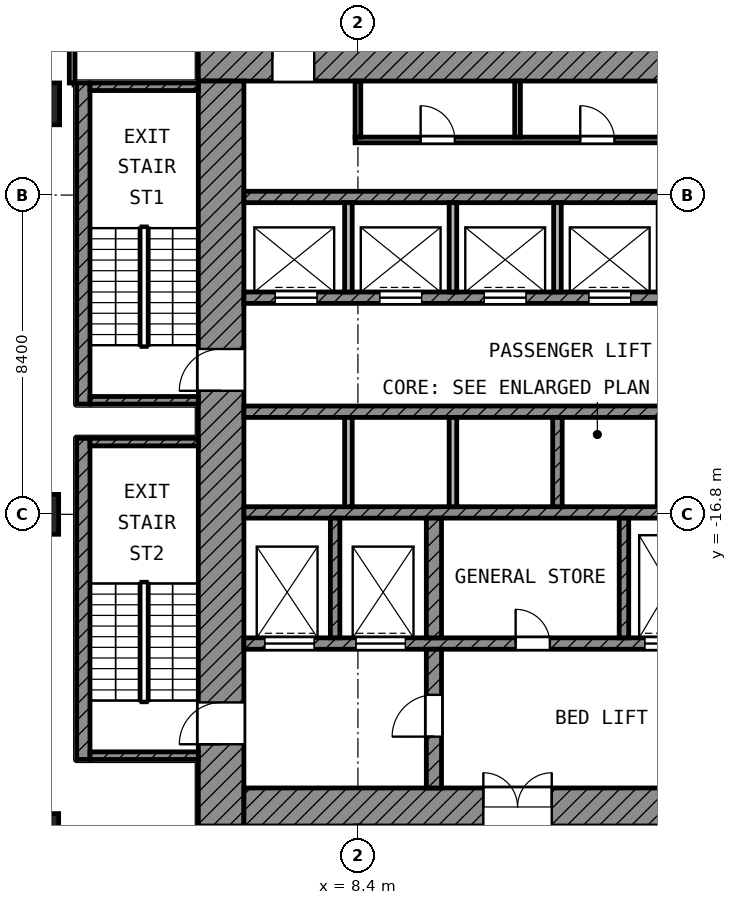
"""IFC4 building model, lengths in metres.
Left out: names, types, materials, properties, quantities, classifications, styles, units other than length and angle.
Written with IfcOpenShell. Run it as: python <this file> out.ifc"""

import sys

from ifc_helpers import new_model, si_unit, direction, frame, frame_2d, origin, origin_2d, place, context, subcontext, project, spatial, rectangle, extrude, element, fill, save


model = new_model("IFC4")
c1 = context("Model", 3, precision=1e-05, world=origin(), true_north=direction((0.0, 1.0)))
c2 = subcontext(c1, "Body", "Model", "MODEL_VIEW")
j1 = project(units=[si_unit("LENGTHUNIT", "METRE"), si_unit("PLANEANGLEUNIT", "RADIAN")], contexts=[c1])
p1 = place(None, origin())
s1 = spatial("IfcSite", under=j1, at=p1, CompositionType="ELEMENT")
p2 = place(p1, origin())
s2 = spatial("IfcBuilding", under=s1, at=p2, CompositionType="ELEMENT")
p3 = place(p2, frame((0.0, 0.0, 124.0)))
s3 = spatial("IfcBuildingStorey", under=s2, at=p3, CompositionType="ELEMENT", Elevation=124.0)
p4 = place(p3, frame((0.0, -6.0, 0.0), z_axis=(0.0, 0.0, 1.0), x_axis=(1.0, 0.0, 0.0)))
e1 = element("IfcColumn", 1, at=p4, inside=s3, PredefinedType="COLUMN", context=c2, shape_type="SweptSolid", body=[
    extrude(rectangle(XDim=1.1, YDim=1.1, at=origin_2d()), origin(), (0.0, 0.0, 1.0), 4.2),
])
for number, where, z_axis, x_axis in (
    (2, (0.0, -16.8, 0.0), (0.0, 0.0, 1.0), (1.0, 0.0, 0.0)),
    (3, (0.0, -25.2, 0.0), (0.0, 0.0, 1.0), (1.0, 0.0, 0.0)),
):
    element("IfcColumn", number, at=place(p3, frame(where, z_axis=z_axis, x_axis=x_axis)), inside=s3, PredefinedType="COLUMN", context=c2, shape_type="SweptSolid", body=[
        extrude(rectangle(XDim=1.05, YDim=1.05, at=origin_2d()), origin(), (0.0, 0.0, 1.0), 4.2),
    ])
p5 = place(p3, frame((4.2, -4.8, 0.0), z_axis=(0.0, 0.0, 1.0), x_axis=(1.0, 0.0, 0.0)))
e4 = element("IfcWall", 4, at=p5, inside=s3, PredefinedType="SHEAR", context=c2, shape_type="SweptSolid", body=[
    extrude(rectangle(XDim=20.8, YDim=1.2, at=frame_2d((10.4, 0.0))), origin(), (0.0, 0.0, 1.0), 3.6),
])
p6 = place(p5, frame((1.95, 0.0, 0.0)))
e5 = element("IfcOpeningElement", 5, at=p6, cuts=e4, PredefinedType="OPENING", context=c2, shape_type="SweptSolid", body=[
    extrude(rectangle(XDim=1.1, YDim=2.1, at=frame_2d((0.55, 1.05))), frame((0.0, 0.61, 0.0), z_axis=(0.0, -1.0, 0.0), x_axis=(1.0, 0.0, 0.0)), (0.0, 0.0, 1.0), 1.22),
])
p7 = place(p5, frame((17.95, 0.0, 0.0)))
e6 = element("IfcOpeningElement", 6, at=p7, cuts=e4, PredefinedType="OPENING", context=c2, shape_type="SweptSolid", body=[
    extrude(rectangle(XDim=1.1, YDim=2.1, at=frame_2d((0.55, 1.05))), frame((0.0, 0.61, 0.0), z_axis=(0.0, -1.0, 0.0), x_axis=(1.0, 0.0, 0.0)), (0.0, 0.0, 1.0), 1.22),
])
p8 = place(p3, frame((4.8, -25.0, 0.0), z_axis=(0.0, 0.0, 1.0), x_axis=(0.0, 1.0, 0.0)))
e7 = element("IfcWall", 7, at=p8, inside=s3, PredefinedType="SHEAR", context=c2, shape_type="SweptSolid", body=[
    extrude(rectangle(XDim=19.6, YDim=1.2, at=frame_2d((9.8, 0.0))), origin(), (0.0, 0.0, 1.0), 3.6),
])
p9 = place(p8, frame((11.45, 0.0, 0.0)))
e8 = element("IfcOpeningElement", 8, at=p9, cuts=e7, PredefinedType="OPENING", context=c2, shape_type="SweptSolid", body=[
    extrude(rectangle(XDim=1.1, YDim=2.1, at=frame_2d((0.55, 1.05))), frame((0.0, 0.61, 0.0), z_axis=(0.0, -1.0, 0.0), x_axis=(1.0, 0.0, 0.0)), (0.0, 0.0, 1.0), 1.22),
])
p10 = place(p8, frame((2.15, 0.0, 0.0)))
e9 = element("IfcOpeningElement", 9, at=p10, cuts=e7, PredefinedType="OPENING", context=c2, shape_type="SweptSolid", body=[
    extrude(rectangle(XDim=1.1, YDim=2.1, at=frame_2d((0.55, 1.05))), frame((0.0, 0.61, 0.0), z_axis=(0.0, -1.0, 0.0), x_axis=(1.0, 0.0, 0.0)), (0.0, 0.0, 1.0), 1.22),
])
p11 = place(p3, frame((5.4, -24.5, 0.0), z_axis=(0.0, 0.0, 1.0), x_axis=(1.0, 0.0, 0.0)))
e10 = element("IfcWall", 10, at=p11, inside=s3, PredefinedType="SHEAR", context=c2, shape_type="SweptSolid", body=[
    extrude(rectangle(XDim=18.6, YDim=1.0, at=frame_2d((9.3, 0.0))), origin(), (0.0, 0.0, 1.0), 3.6),
])
p12 = place(p11, frame((6.3, 0.0, 0.0)))
e11 = element("IfcOpeningElement", 11, at=p12, cuts=e10, PredefinedType="OPENING", context=c2, shape_type="SweptSolid", body=[
    extrude(rectangle(XDim=1.8, YDim=2.1, at=frame_2d((0.9, 1.05))), frame((0.0, 0.51, 0.0), z_axis=(0.0, -1.0, 0.0), x_axis=(1.0, 0.0, 0.0)), (0.0, 0.0, 1.0), 1.02),
])
p13 = place(p3, frame((5.4, -8.45, 0.0), z_axis=(0.0, 0.0, 1.0), x_axis=(1.0, 0.0, 0.0)))
e12 = element("IfcWall", 12, at=p13, inside=s3, PredefinedType="SHEAR", context=c2, shape_type="SweptSolid", body=[
    extrude(rectangle(XDim=16.65, YDim=0.3, at=frame_2d((8.325, 0.0))), origin(), (0.0, 0.0, 1.0), 3.6),
])
p14 = place(p3, frame((5.4, -11.1, 0.0), z_axis=(0.0, 0.0, 1.0), x_axis=(1.0, 0.0, 0.0)))
e13 = element("IfcWall", 13, at=p14, inside=s3, PredefinedType="SHEAR", context=c2, shape_type="SweptSolid", body=[
    extrude(rectangle(XDim=16.65, YDim=0.3, at=frame_2d((8.325, 0.0))), origin(), (0.0, 0.0, 1.0), 3.6),
])
p15 = place(p14, frame((0.825, 0.0, 0.0)))
e14 = element("IfcOpeningElement", 14, at=p15, cuts=e13, PredefinedType="OPENING", context=c2, shape_type="SweptSolid", body=[
    extrude(rectangle(XDim=1.1, YDim=2.1, at=frame_2d((0.55, 1.05))), frame((0.0, 0.16, 0.0), z_axis=(0.0, -1.0, 0.0), x_axis=(1.0, 0.0, 0.0)), (0.0, 0.0, 1.0), 0.32),
])
p16 = place(p14, frame((3.575, 0.0, 0.0)))
e15 = element("IfcOpeningElement", 15, at=p16, cuts=e13, PredefinedType="OPENING", context=c2, shape_type="SweptSolid", body=[
    extrude(rectangle(XDim=1.1, YDim=2.1, at=frame_2d((0.55, 1.05))), frame((0.0, 0.16, 0.0), z_axis=(0.0, -1.0, 0.0), x_axis=(1.0, 0.0, 0.0)), (0.0, 0.0, 1.0), 0.32),
])
p17 = place(p14, frame((6.325, 0.0, 0.0)))
e16 = element("IfcOpeningElement", 16, at=p17, cuts=e13, PredefinedType="OPENING", context=c2, shape_type="SweptSolid", body=[
    extrude(rectangle(XDim=1.1, YDim=2.1, at=frame_2d((0.55, 1.05))), frame((0.0, 0.16, 0.0), z_axis=(0.0, -1.0, 0.0), x_axis=(1.0, 0.0, 0.0)), (0.0, 0.0, 1.0), 0.32),
])
p18 = place(p14, frame((9.075, 0.0, 0.0)))
e17 = element("IfcOpeningElement", 17, at=p18, cuts=e13, PredefinedType="OPENING", context=c2, shape_type="SweptSolid", body=[
    extrude(rectangle(XDim=1.1, YDim=2.1, at=frame_2d((0.55, 1.05))), frame((0.0, 0.16, 0.0), z_axis=(0.0, -1.0, 0.0), x_axis=(1.0, 0.0, 0.0)), (0.0, 0.0, 1.0), 0.32),
])
for number, where, z_axis, x_axis in (
    (18, (5.4, -14.1, 0.0), (0.0, 0.0, 1.0), (1.0, 0.0, 0.0)),
    (19, (5.4, -16.75, 0.0), (0.0, 0.0, 1.0), (1.0, 0.0, 0.0)),
):
    element("IfcWall", number, at=place(p3, frame(where, z_axis=z_axis, x_axis=x_axis)), inside=s3, PredefinedType="SHEAR", context=c2, shape_type="SweptSolid", body=[
        extrude(rectangle(XDim=16.65, YDim=0.3, at=frame_2d((8.325, 0.0))), origin(), (0.0, 0.0, 1.0), 3.6),
    ])
p19 = place(p3, frame((5.4, -20.2, 0.0), z_axis=(0.0, 0.0, 1.0), x_axis=(1.0, 0.0, 0.0)))
e20 = element("IfcWall", 20, at=p19, inside=s3, PredefinedType="SHEAR", context=c2, shape_type="SweptSolid", body=[
    extrude(rectangle(XDim=14.65, YDim=0.3, at=frame_2d((7.325, 0.0))), origin(), (0.0, 0.0, 1.0), 3.6),
])
p20 = place(p19, frame((10.55, 0.0, 0.0)))
e21 = element("IfcOpeningElement", 21, at=p20, cuts=e20, PredefinedType="OPENING", context=c2, shape_type="SweptSolid", body=[
    extrude(rectangle(XDim=1.3, YDim=2.1, at=frame_2d((0.65, 1.05))), frame((0.0, 0.16, 0.0), z_axis=(0.0, -1.0, 0.0), x_axis=(1.0, 0.0, 0.0)), (0.0, 0.0, 1.0), 0.32),
])
p21 = place(p19, frame((12.95, 0.0, 0.0)))
e22 = element("IfcOpeningElement", 22, at=p21, cuts=e20, PredefinedType="OPENING", context=c2, shape_type="SweptSolid", body=[
    extrude(rectangle(XDim=1.3, YDim=2.1, at=frame_2d((0.65, 1.05))), frame((0.0, 0.16, 0.0), z_axis=(0.0, -1.0, 0.0), x_axis=(1.0, 0.0, 0.0)), (0.0, 0.0, 1.0), 0.32),
])
p22 = place(p19, frame((0.55, 0.0, 0.0)))
e23 = element("IfcOpeningElement", 23, at=p22, cuts=e20, PredefinedType="OPENING", context=c2, shape_type="SweptSolid", body=[
    extrude(rectangle(XDim=1.3, YDim=2.1, at=frame_2d((0.65, 1.05))), frame((0.0, 0.16, 0.0), z_axis=(0.0, -1.0, 0.0), x_axis=(1.0, 0.0, 0.0)), (0.0, 0.0, 1.0), 0.32),
])
p23 = place(p19, frame((2.95, 0.0, 0.0)))
e24 = element("IfcOpeningElement", 24, at=p23, cuts=e20, PredefinedType="OPENING", context=c2, shape_type="SweptSolid", body=[
    extrude(rectangle(XDim=1.3, YDim=2.1, at=frame_2d((0.65, 1.05))), frame((0.0, 0.16, 0.0), z_axis=(0.0, -1.0, 0.0), x_axis=(1.0, 0.0, 0.0)), (0.0, 0.0, 1.0), 0.32),
])
p24 = place(p19, frame((7.15, 0.0, 0.0)))
e25 = element("IfcOpeningElement", 25, at=p24, cuts=e20, PredefinedType="OPENING", context=c2, shape_type="SweptSolid", body=[
    extrude(rectangle(XDim=0.9, YDim=2.1, at=frame_2d((0.45, 1.05))), frame((0.0, 0.16, 0.0), z_axis=(0.0, -1.0, 0.0), x_axis=(1.0, 0.0, 0.0)), (0.0, 0.0, 1.0), 0.32),
])
p25 = place(p3, frame((10.4, -24.0, 0.0), z_axis=(0.0, 0.0, 1.0), x_axis=(0.0, 1.0, 0.0)))
e26 = element("IfcWall", 26, at=p25, inside=s3, PredefinedType="SHEAR", context=c2, shape_type="SweptSolid", body=[
    extrude(rectangle(XDim=3.65, YDim=0.4, at=frame_2d((1.825, 0.0))), origin(), (0.0, 0.0, 1.0), 3.6),
])
p26 = place(p25, frame((1.35, 0.0, 0.0)))
e27 = element("IfcOpeningElement", 27, at=p26, cuts=e26, PredefinedType="OPENING", context=c2, shape_type="SweptSolid", body=[
    extrude(rectangle(XDim=1.1, YDim=2.1, at=frame_2d((0.55, 1.05))), frame((0.0, 0.21, 0.0), z_axis=(0.0, -1.0, 0.0), x_axis=(1.0, 0.0, 0.0)), (0.0, 0.0, 1.0), 0.42),
])
p27 = place(p3, frame((10.4, -20.05, 0.0), z_axis=(0.0, 0.0, 1.0), x_axis=(0.0, 1.0, 0.0)))
e28 = element("IfcWall", 28, at=p27, inside=s3, PredefinedType="SHEAR", context=c2, shape_type="SweptSolid", body=[
    extrude(rectangle(XDim=3.15, YDim=0.4, at=frame_2d((1.575, 0.0))), origin(), (0.0, 0.0, 1.0), 3.6),
])
for number, where, z_axis, x_axis in (
    (29, (7.8, -20.05, 0.0), (0.0, 0.0, 1.0), (0.0, 1.0, 0.0)),
    (30, (15.4, -20.05, 0.0), (0.0, 0.0, 1.0), (0.0, 1.0, 0.0)),
):
    element("IfcWall", number, at=place(p3, frame(where, z_axis=z_axis, x_axis=x_axis)), inside=s3, PredefinedType="SHEAR", context=c2, shape_type="SweptSolid", body=[
        extrude(rectangle(XDim=3.15, YDim=0.25, at=frame_2d((1.575, 0.0))), origin(), (0.0, 0.0, 1.0), 3.6),
    ])
for number, where, z_axis, x_axis in (
    (31, (8.15, -10.95, 0.0), (0.0, 0.0, 1.0), (0.0, 1.0, 0.0)),
    (32, (10.9, -10.95, 0.0), (0.0, 0.0, 1.0), (0.0, 1.0, 0.0)),
    (33, (13.65, -10.95, 0.0), (0.0, 0.0, 1.0), (0.0, 1.0, 0.0)),
):
    element("IfcWall", number, at=place(p3, frame(where, z_axis=z_axis, x_axis=x_axis)), inside=s3, PredefinedType="PARTITIONING", context=c2, shape_type="SweptSolid", body=[
        extrude(rectangle(XDim=2.35, YDim=0.2, at=frame_2d((1.175, 0.0))), origin(), (0.0, 0.0, 1.0), 3.6),
    ])
for number, where, z_axis, x_axis in (
    (34, (8.15, -16.6, 0.0), (0.0, 0.0, 1.0), (0.0, 1.0, 0.0)),
    (35, (10.9, -16.6, 0.0), (0.0, 0.0, 1.0), (0.0, 1.0, 0.0)),
):
    element("IfcWall", number, at=place(p3, frame(where, z_axis=z_axis, x_axis=x_axis)), inside=s3, PredefinedType="PARTITIONING", context=c2, shape_type="SweptSolid", body=[
        extrude(rectangle(XDim=2.35, YDim=0.2, at=frame_2d((1.175, 0.0))), origin(), (0.0, 0.0, 1.0), 3.6),
    ])
p28 = place(p3, frame((13.65, -16.6, 0.0), z_axis=(0.0, 0.0, 1.0), x_axis=(0.0, 1.0, 0.0)))
e36 = element("IfcWall", 36, at=p28, inside=s3, PredefinedType="SHEAR", context=c2, shape_type="SweptSolid", body=[
    extrude(rectangle(XDim=2.35, YDim=0.25, at=frame_2d((1.175, 0.0))), origin(), (0.0, 0.0, 1.0), 3.6),
])
p29 = place(p3, frame((8.325, -6.95, 0.0), z_axis=(0.0, 0.0, 1.0), x_axis=(1.0, 0.0, 0.0)))
e37 = element("IfcWall", 37, at=p29, inside=s3, PredefinedType="PARTITIONING", context=c2, shape_type="SweptSolid", body=[
    extrude(rectangle(XDim=12.75, YDim=0.15, at=frame_2d((6.375, 0.0))), origin(), (0.0, 0.0, 1.0), 3.6),
])
p30 = place(p29, frame((1.725, 0.0, 0.0)))
e38 = element("IfcOpeningElement", 38, at=p30, cuts=e37, PredefinedType="OPENING", context=c2, shape_type="SweptSolid", body=[
    extrude(rectangle(XDim=0.9, YDim=2.1, at=frame_2d((0.45, 1.05))), frame((0.0, 0.085, 0.0), z_axis=(0.0, -1.0, 0.0), x_axis=(1.0, 0.0, 0.0)), (0.0, 0.0, 1.0), 0.17),
])
p31 = place(p29, frame((5.925, 0.0, 0.0)))
e39 = element("IfcOpeningElement", 39, at=p31, cuts=e37, PredefinedType="OPENING", context=c2, shape_type="SweptSolid", body=[
    extrude(rectangle(XDim=0.9, YDim=2.1, at=frame_2d((0.45, 1.05))), frame((0.0, 0.085, 0.0), z_axis=(0.0, -1.0, 0.0), x_axis=(1.0, 0.0, 0.0)), (0.0, 0.0, 1.0), 0.17),
])
p32 = place(p29, frame((10.125, 0.0, 0.0)))
e40 = element("IfcOpeningElement", 40, at=p32, cuts=e37, PredefinedType="OPENING", context=c2, shape_type="SweptSolid", body=[
    extrude(rectangle(XDim=0.9, YDim=2.1, at=frame_2d((0.45, 1.05))), frame((0.0, 0.085, 0.0), z_axis=(0.0, -1.0, 0.0), x_axis=(1.0, 0.0, 0.0)), (0.0, 0.0, 1.0), 0.17),
])
for number, where, z_axis, x_axis in (
    (41, (8.4, -6.875, 0.0), (0.0, 0.0, 1.0), (0.0, 1.0, 0.0)),
    (42, (12.6, -6.875, 0.0), (0.0, 0.0, 1.0), (0.0, 1.0, 0.0)),
):
    element("IfcWall", number, at=place(p3, frame(where, z_axis=z_axis, x_axis=x_axis)), inside=s3, PredefinedType="PARTITIONING", context=c2, shape_type="SweptSolid", body=[
        extrude(rectangle(XDim=1.475, YDim=0.15, at=frame_2d((0.738, 0.0))), origin(), (0.0, 0.0, 1.0), 3.6),
    ])
p33 = place(p3, frame((1.175, -13.9, 0.0), z_axis=(0.0, 0.0, 1.0), x_axis=(0.0, 1.0, 0.0)))
e43 = element("IfcWall", 43, at=p33, inside=s3, PredefinedType="SHEAR", context=c2, shape_type="SweptSolid", body=[
    extrude(rectangle(XDim=8.45, YDim=0.35, at=frame_2d((4.225, 0.0))), origin(), (0.0, 0.0, 1.0), 3.6),
])
for number, where, z_axis, x_axis in (
    (44, (1.35, -5.55, 0.0), (0.0, 0.0, 1.0), (1.0, 0.0, 0.0)),
    (45, (1.35, -13.8, 0.0), (0.0, 0.0, 1.0), (1.0, 0.0, 0.0)),
):
    element("IfcWall", number, at=place(p3, frame(where, z_axis=z_axis, x_axis=x_axis)), inside=s3, PredefinedType="SHEAR", context=c2, shape_type="SweptSolid", body=[
        extrude(rectangle(XDim=2.85, YDim=0.2, at=frame_2d((1.425, 0.0))), origin(), (0.0, 0.0, 1.0), 3.6),
    ])
p34 = place(p3, frame((1.175, -23.25, 0.0), z_axis=(0.0, 0.0, 1.0), x_axis=(0.0, 1.0, 0.0)))
e46 = element("IfcWall", 46, at=p34, inside=s3, PredefinedType="SHEAR", context=c2, shape_type="SweptSolid", body=[
    extrude(rectangle(XDim=8.45, YDim=0.35, at=frame_2d((4.225, 0.0))), origin(), (0.0, 0.0, 1.0), 3.6),
])
for number, where, z_axis, x_axis in (
    (47, (1.35, -14.9, 0.0), (0.0, 0.0, 1.0), (1.0, 0.0, 0.0)),
    (48, (1.35, -23.15, 0.0), (0.0, 0.0, 1.0), (1.0, 0.0, 0.0)),
):
    element("IfcWall", number, at=place(p3, frame(where, z_axis=z_axis, x_axis=x_axis)), inside=s3, PredefinedType="SHEAR", context=c2, shape_type="SweptSolid", body=[
        extrude(rectangle(XDim=2.85, YDim=0.2, at=frame_2d((1.425, 0.0))), origin(), (0.0, 0.0, 1.0), 3.6),
    ])
p35 = place(p3, frame((0.88, -5.45, 0.0), z_axis=(0.0, 0.0, 1.0), x_axis=(0.0, 1.0, 0.0)))
e49 = element("IfcWall", 49, at=p35, inside=s3, PredefinedType="PARTITIONING", context=c2, shape_type="SweptSolid", body=[
    extrude(rectangle(XDim=5.128, YDim=0.15, at=frame_2d((2.564, 0.0))), origin(), (0.0, 0.0, 1.0), 3.6),
])
p36 = place(p3, frame((8.4, -31.782, 0.0), z_axis=(0.0, 0.0, 1.0), x_axis=(0.0, 1.0, 0.0)))
e50 = element("IfcWall", 50, at=p36, inside=s3, PredefinedType="PARTITIONING", context=c2, shape_type="SweptSolid", body=[
    extrude(rectangle(XDim=6.782, YDim=0.15, at=frame_2d((3.391, 0.0))), origin(), (0.0, 0.0, 1.0), 3.6),
])
p37 = place(p36, frame((4.182, 0.0, 0.0)))
e51 = element("IfcOpeningElement", 51, at=p37, cuts=e50, PredefinedType="OPENING", context=c2, shape_type="SweptSolid", body=[
    extrude(rectangle(XDim=1.2, YDim=2.1, at=frame_2d((0.6, 1.05))), frame((0.0, 0.085, 0.0), z_axis=(0.0, -1.0, 0.0), x_axis=(1.0, 0.0, 0.0)), (0.0, 0.0, 1.0), 0.17),
])
p38 = place(p15, origin())
e52 = element("IfcDoor", 52, at=p38, inside=s3, OperationType="DOUBLE_DOOR_SLIDING", PredefinedType="DOOR", context=c2, shape_type="SweptSolid", body=[
    extrude(rectangle(XDim=1.1, YDim=2.1, at=frame_2d((0.55, 1.05))), frame((0.0, 0.025, 0.0), z_axis=(0.0, -1.0, 0.0), x_axis=(1.0, 0.0, 0.0)), (0.0, 0.0, 1.0), 0.05),
])
fill(e14, e52)
p39 = place(p16, origin())
e53 = element("IfcDoor", 53, at=p39, inside=s3, OperationType="DOUBLE_DOOR_SLIDING", PredefinedType="DOOR", context=c2, shape_type="SweptSolid", body=[
    extrude(rectangle(XDim=1.1, YDim=2.1, at=frame_2d((0.55, 1.05))), frame((0.0, 0.025, 0.0), z_axis=(0.0, -1.0, 0.0), x_axis=(1.0, 0.0, 0.0)), (0.0, 0.0, 1.0), 0.05),
])
fill(e15, e53)
p40 = place(p17, origin())
e54 = element("IfcDoor", 54, at=p40, inside=s3, OperationType="DOUBLE_DOOR_SLIDING", PredefinedType="DOOR", context=c2, shape_type="SweptSolid", body=[
    extrude(rectangle(XDim=1.1, YDim=2.1, at=frame_2d((0.55, 1.05))), frame((0.0, 0.025, 0.0), z_axis=(0.0, -1.0, 0.0), x_axis=(1.0, 0.0, 0.0)), (0.0, 0.0, 1.0), 0.05),
])
fill(e16, e54)
p41 = place(p18, origin())
e55 = element("IfcDoor", 55, at=p41, inside=s3, OperationType="DOUBLE_DOOR_SLIDING", PredefinedType="DOOR", context=c2, shape_type="SweptSolid", body=[
    extrude(rectangle(XDim=1.1, YDim=2.1, at=frame_2d((0.55, 1.05))), frame((0.0, 0.025, 0.0), z_axis=(0.0, -1.0, 0.0), x_axis=(1.0, 0.0, 0.0)), (0.0, 0.0, 1.0), 0.05),
])
fill(e17, e55)
p42 = place(p20, origin())
e56 = element("IfcDoor", 56, at=p42, inside=s3, OperationType="DOUBLE_DOOR_SLIDING", PredefinedType="DOOR", context=c2, shape_type="SweptSolid", body=[
    extrude(rectangle(XDim=1.3, YDim=2.1, at=frame_2d((0.65, 1.05))), frame((0.0, 0.025, 0.0), z_axis=(0.0, -1.0, 0.0), x_axis=(1.0, 0.0, 0.0)), (0.0, 0.0, 1.0), 0.05),
])
fill(e21, e56)
p43 = place(p22, origin())
e57 = element("IfcDoor", 57, at=p43, inside=s3, OperationType="DOUBLE_DOOR_SLIDING", PredefinedType="DOOR", context=c2, shape_type="SweptSolid", body=[
    extrude(rectangle(XDim=1.3, YDim=2.1, at=frame_2d((0.65, 1.05))), frame((0.0, 0.025, 0.0), z_axis=(0.0, -1.0, 0.0), x_axis=(1.0, 0.0, 0.0)), (0.0, 0.0, 1.0), 0.05),
])
fill(e23, e57)
p44 = place(p23, origin())
e58 = element("IfcDoor", 58, at=p44, inside=s3, OperationType="DOUBLE_DOOR_SLIDING", PredefinedType="DOOR", context=c2, shape_type="SweptSolid", body=[
    extrude(rectangle(XDim=1.3, YDim=2.1, at=frame_2d((0.65, 1.05))), frame((0.0, 0.025, 0.0), z_axis=(0.0, -1.0, 0.0), x_axis=(1.0, 0.0, 0.0)), (0.0, 0.0, 1.0), 0.05),
])
fill(e24, e58)
p45 = place(p9, origin())
e59 = element("IfcDoor", 59, at=p45, inside=s3, OperationType="SINGLE_SWING_LEFT", PredefinedType="DOOR", context=c2, shape_type="SweptSolid", body=[
    extrude(rectangle(XDim=1.1, YDim=2.1, at=frame_2d((0.55, 1.05))), frame((0.0, 0.025, 0.0), z_axis=(0.0, -1.0, 0.0), x_axis=(1.0, 0.0, 0.0)), (0.0, 0.0, 1.0), 0.05),
])
fill(e8, e59)
p46 = place(p10, origin())
e60 = element("IfcDoor", 60, at=p46, inside=s3, OperationType="SINGLE_SWING_LEFT", PredefinedType="DOOR", context=c2, shape_type="SweptSolid", body=[
    extrude(rectangle(XDim=1.1, YDim=2.1, at=frame_2d((0.55, 1.05))), frame((0.0, 0.025, 0.0), z_axis=(0.0, -1.0, 0.0), x_axis=(1.0, 0.0, 0.0)), (0.0, 0.0, 1.0), 0.05),
])
fill(e9, e60)
p47 = place(p6, origin())
e61 = element("IfcDoor", 61, at=p47, inside=s3, OperationType="SINGLE_SWING_LEFT", PredefinedType="DOOR", context=c2, shape_type="SweptSolid", body=[
    extrude(rectangle(XDim=1.1, YDim=2.1, at=frame_2d((0.55, 1.05))), frame((0.0, 0.025, 0.0), z_axis=(0.0, -1.0, 0.0), x_axis=(1.0, 0.0, 0.0)), (0.0, 0.0, 1.0), 0.05),
])
fill(e5, e61)
p48 = place(p26, origin())
e62 = element("IfcDoor", 62, at=p48, inside=s3, OperationType="SINGLE_SWING_LEFT", PredefinedType="DOOR", context=c2, shape_type="SweptSolid", body=[
    extrude(rectangle(XDim=1.1, YDim=2.1, at=frame_2d((0.55, 1.05))), frame((0.0, 0.025, 0.0), z_axis=(0.0, -1.0, 0.0), x_axis=(1.0, 0.0, 0.0)), (0.0, 0.0, 1.0), 0.05),
])
fill(e27, e62)
p49 = place(p12, origin())
e63 = element("IfcDoor", 63, at=p49, inside=s3, OperationType="DOUBLE_DOOR_SINGLE_SWING", PredefinedType="DOOR", context=c2, shape_type="SweptSolid", body=[
    extrude(rectangle(XDim=1.8, YDim=2.1, at=frame_2d((0.9, 1.05))), frame((0.0, 0.025, 0.0), z_axis=(0.0, -1.0, 0.0), x_axis=(1.0, 0.0, 0.0)), (0.0, 0.0, 1.0), 0.05),
])
fill(e11, e63)
p50 = place(p30, origin())
e64 = element("IfcDoor", 64, at=p50, inside=s3, OperationType="SINGLE_SWING_LEFT", PredefinedType="DOOR", context=c2, shape_type="SweptSolid", body=[
    extrude(rectangle(XDim=0.9, YDim=2.1, at=frame_2d((0.45, 1.05))), frame((0.0, 0.025, 0.0), z_axis=(0.0, -1.0, 0.0), x_axis=(1.0, 0.0, 0.0)), (0.0, 0.0, 1.0), 0.05),
])
fill(e38, e64)
p51 = place(p31, origin())
e65 = element("IfcDoor", 65, at=p51, inside=s3, OperationType="SINGLE_SWING_LEFT", PredefinedType="DOOR", context=c2, shape_type="SweptSolid", body=[
    extrude(rectangle(XDim=0.9, YDim=2.1, at=frame_2d((0.45, 1.05))), frame((0.0, 0.025, 0.0), z_axis=(0.0, -1.0, 0.0), x_axis=(1.0, 0.0, 0.0)), (0.0, 0.0, 1.0), 0.05),
])
fill(e39, e65)
p52 = place(p24, origin())
e66 = element("IfcDoor", 66, at=p52, inside=s3, OperationType="SINGLE_SWING_LEFT", PredefinedType="DOOR", context=c2, shape_type="SweptSolid", body=[
    extrude(rectangle(XDim=0.9, YDim=2.1, at=frame_2d((0.45, 1.05))), frame((0.0, 0.025, 0.0), z_axis=(0.0, -1.0, 0.0), x_axis=(1.0, 0.0, 0.0)), (0.0, 0.0, 1.0), 0.05),
])
fill(e25, e66)
save(model, sys.argv[1])
